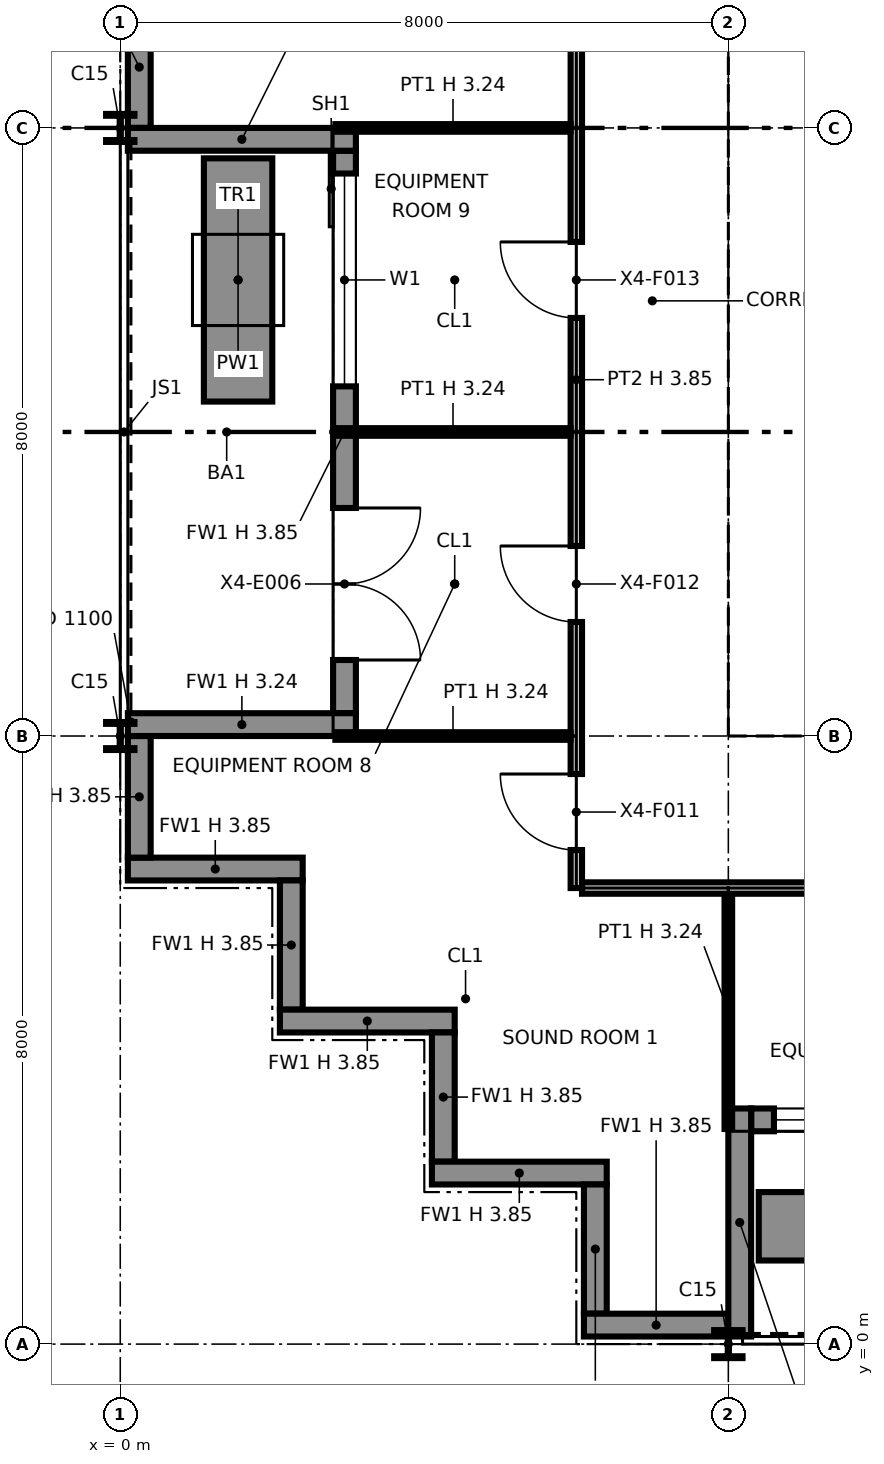
"""IFC4 building model, lengths in metres.
Left out: names, types, materials, properties, quantities, classifications, styles, units other than length and angle.
Written with IfcOpenShell. Run it as: python <this file> out.ifc"""

import sys

from ifc_helpers import new_model, si_unit, direction, frame, frame_2d, origin, origin_2d, place, context, subcontext, project, spatial, polyline, rectangle, i_section, outline, extrude, element, fill, save


model = new_model("IFC4")
c1 = context("Model", 3, precision=1e-05, world=origin(), true_north=direction((0.0, 1.0)))
c2 = subcontext(c1, "Body", "Model", "MODEL_VIEW")
j1 = project(units=[si_unit("LENGTHUNIT", "METRE"), si_unit("PLANEANGLEUNIT", "RADIAN")], contexts=[c1])
p1 = place(None, origin())
s1 = spatial("IfcSite", under=j1, at=p1, CompositionType="ELEMENT")
p2 = place(p1, origin())
s2 = spatial("IfcBuilding", under=s1, at=p2, CompositionType="ELEMENT")
p3 = place(p2, frame((0.0, 0.0, 279.0)))
s3 = spatial("IfcBuildingStorey", under=s2, at=p3, CompositionType="ELEMENT", Elevation=279.0)
for number, where, z_axis, x_axis in (
    (1, (0.0, 8.0, 0.0), (0.0, 0.0, 1.0), (1.0, 0.0, 0.0)),
    (2, (0.0, 16.0, 0.0), (0.0, 0.0, 1.0), (1.0, 0.0, 0.0)),
    (3, (8.0, 0.0, 0.0), (0.0, 0.0, 1.0), (1.0, 0.0, 0.0)),
):
    element("IfcColumn", number, at=place(p3, frame(where, z_axis=z_axis, x_axis=x_axis)), inside=s3, PredefinedType="COLUMN", context=c2, shape_type="SweptSolid", body=[
        extrude(i_section(OverallWidth=0.373, OverallDepth=0.368, WebThickness=0.015, FlangeThickness=0.024, at=origin_2d()), origin(), (0.0, 0.0, 1.0), 3.85),
    ])
for number, where, z_axis, x_axis in (
    (4, (8.0, 8.0, 0.0), (0.0, 0.0, 1.0), (1.0, 0.0, 0.0)),
    (5, (8.0, 16.0, 0.0), (0.0, 0.0, 1.0), (1.0, 0.0, 0.0)),
):
    element("IfcColumn", number, at=place(p3, frame(where, z_axis=z_axis, x_axis=x_axis)), inside=s3, PredefinedType="COLUMN", context=c2, shape_type="SweptSolid", body=[
        extrude(i_section(OverallWidth=0.257, OverallDepth=0.363, WebThickness=0.013, FlangeThickness=0.022, at=origin_2d()), origin(), (0.0, 0.0, 1.0), 3.85),
    ])
p4 = place(p3, frame((0.1, 6.25, 0.0), z_axis=(0.0, 0.0, 1.0), x_axis=(1.0, 0.0, 0.0)))
e6 = element("IfcWall", 6, at=p4, inside=s3, PredefinedType="SOLIDWALL", context=c2, shape_type="SweptSolid", body=[
    extrude(rectangle(XDim=2.3, YDim=0.3, at=frame_2d((1.15, 0.0))), origin(), (0.0, 0.0, 1.0), 3.85),
])
p5 = place(p3, frame((2.25, 6.1, 0.0), z_axis=(0.0, 0.0, 1.0), x_axis=(0.0, -1.0, 0.0)))
e7 = element("IfcWall", 7, at=p5, inside=s3, PredefinedType="SOLIDWALL", context=c2, shape_type="SweptSolid", body=[
    extrude(rectangle(XDim=1.7, YDim=0.3, at=frame_2d((0.85, 0.0))), origin(), (0.0, 0.0, 1.0), 3.85),
])
p6 = place(p3, frame((2.1, 4.25, 0.0), z_axis=(0.0, 0.0, 1.0), x_axis=(1.0, 0.0, 0.0)))
e8 = element("IfcWall", 8, at=p6, inside=s3, PredefinedType="SOLIDWALL", context=c2, shape_type="SweptSolid", body=[
    extrude(rectangle(XDim=2.3, YDim=0.3, at=frame_2d((1.15, 0.0))), origin(), (0.0, 0.0, 1.0), 3.85),
])
p7 = place(p3, frame((4.25, 4.1, 0.0), z_axis=(0.0, 0.0, 1.0), x_axis=(0.0, -1.0, 0.0)))
e9 = element("IfcWall", 9, at=p7, inside=s3, PredefinedType="SOLIDWALL", context=c2, shape_type="SweptSolid", body=[
    extrude(rectangle(XDim=1.7, YDim=0.3, at=frame_2d((0.85, 0.0))), origin(), (0.0, 0.0, 1.0), 3.85),
])
p8 = place(p3, frame((4.1, 2.25, 0.0), z_axis=(0.0, 0.0, 1.0), x_axis=(1.0, 0.0, 0.0)))
e10 = element("IfcWall", 10, at=p8, inside=s3, PredefinedType="SOLIDWALL", context=c2, shape_type="SweptSolid", body=[
    extrude(rectangle(XDim=2.3, YDim=0.3, at=frame_2d((1.15, 0.0))), origin(), (0.0, 0.0, 1.0), 3.85),
])
p9 = place(p3, frame((6.25, 2.1, 0.0), z_axis=(0.0, 0.0, 1.0), x_axis=(0.0, -1.0, 0.0)))
e11 = element("IfcWall", 11, at=p9, inside=s3, PredefinedType="SOLIDWALL", context=c2, shape_type="SweptSolid", body=[
    extrude(rectangle(XDim=1.7, YDim=0.3, at=frame_2d((0.85, 0.0))), origin(), (0.0, 0.0, 1.0), 3.85),
])
p10 = place(p3, frame((6.1, 0.25, 0.0), z_axis=(0.0, 0.0, 1.0), x_axis=(1.0, 0.0, 0.0)))
e12 = element("IfcWall", 12, at=p10, inside=s3, PredefinedType="SOLIDWALL", context=c2, shape_type="SweptSolid", body=[
    extrude(rectangle(XDim=1.9, YDim=0.3, at=frame_2d((0.95, 0.0))), origin(), (0.0, 0.0, 1.0), 3.85),
])
p11 = place(p3, frame((8.3, 2.95, 0.0), z_axis=(0.0, 0.0, 1.0), x_axis=(1.0, 0.0, 0.0)))
e13 = element("IfcWall", 13, at=p11, inside=s3, PredefinedType="SOLIDWALL", context=c2, shape_type="SweptSolid", body=[
    extrude(rectangle(XDim=7.4, YDim=0.3, at=frame_2d((3.7, 0.0))), origin(), (0.0, 0.0, 1.0), 3.85),
])
p12 = place(p11, frame((0.3, 0.0, 0.9)))
e14 = element("IfcOpeningElement", 14, at=p12, cuts=e13, PredefinedType="OPENING", context=c2, shape_type="SweptSolid", body=[
    extrude(rectangle(XDim=2.8, YDim=2.2, at=frame_2d((1.4, 1.1))), frame((0.0, 0.16, 0.0), z_axis=(0.0, -1.0, 0.0), x_axis=(1.0, 0.0, 0.0)), (0.0, 0.0, 1.0), 0.32),
])
p13 = place(p11, frame((4.7, 0.0, 0.0)))
e15 = element("IfcOpeningElement", 15, at=p13, cuts=e13, PredefinedType="OPENING", context=c2, shape_type="SweptSolid", body=[
    extrude(rectangle(XDim=2.0, YDim=2.4, at=frame_2d((1.0, 1.2))), frame((0.0, 0.16, 0.0), z_axis=(0.0, -1.0, 0.0), x_axis=(1.0, 0.0, 0.0)), (0.0, 0.0, 1.0), 0.32),
])
p14 = place(p3, frame((8.15, 0.1, 0.0), z_axis=(0.0, 0.0, 1.0), x_axis=(0.0, 1.0, 0.0)))
e16 = element("IfcWall", 16, at=p14, inside=s3, PredefinedType="SOLIDWALL", context=c2, shape_type="SweptSolid", body=[
    extrude(rectangle(XDim=3.0, YDim=0.3, at=frame_2d((1.5, 0.0))), origin(), (0.0, 0.0, 1.0), 3.237),
])
p15 = place(p3, frame((8.4, 1.55, 0.0), z_axis=(0.0, 0.0, 1.0), x_axis=(1.0, 0.0, 0.0)))
e17 = element("IfcWall", 17, at=p15, inside=s3, PredefinedType="SOLIDWALL", context=c2, shape_type="SweptSolid", body=[
    extrude(rectangle(XDim=3.2, YDim=0.9, at=frame_2d((1.6, 0.0))), origin(), (0.0, 0.0, 1.0), 0.6),
])
p16 = place(p3, frame((0.25, 17.6, 0.0), z_axis=(0.0, 0.0, 1.0), x_axis=(0.0, -1.0, 0.0)))
e18 = element("IfcWall", 18, at=p16, inside=s3, PredefinedType="SOLIDWALL", context=c2, shape_type="SweptSolid", body=[
    extrude(rectangle(XDim=1.6, YDim=0.3, at=frame_2d((0.8, 0.0))), origin(), (0.0, 0.0, 1.0), 3.85),
])
p17 = place(p3, frame((2.95, 15.7, 0.0), z_axis=(0.0, 0.0, 1.0), x_axis=(0.0, -1.0, 0.0)))
e19 = element("IfcWall", 19, at=p17, inside=s3, PredefinedType="SOLIDWALL", context=c2, shape_type="SweptSolid", body=[
    extrude(rectangle(XDim=7.4, YDim=0.3, at=frame_2d((3.7, 0.0))), origin(), (0.0, 0.0, 1.0), 3.85),
])
p18 = place(p17, frame((0.3, 0.0, 0.9)))
e20 = element("IfcOpeningElement", 20, at=p18, cuts=e19, PredefinedType="OPENING", context=c2, shape_type="SweptSolid", body=[
    extrude(rectangle(XDim=2.8, YDim=2.2, at=frame_2d((1.4, 1.1))), frame((0.0, 0.16, 0.0), z_axis=(0.0, -1.0, 0.0), x_axis=(1.0, 0.0, 0.0)), (0.0, 0.0, 1.0), 0.32),
])
p19 = place(p17, frame((4.7, 0.0, 0.0)))
e21 = element("IfcOpeningElement", 21, at=p19, cuts=e19, PredefinedType="OPENING", context=c2, shape_type="SweptSolid", body=[
    extrude(rectangle(XDim=2.0, YDim=2.4, at=frame_2d((1.0, 1.2))), frame((0.0, 0.16, 0.0), z_axis=(0.0, -1.0, 0.0), x_axis=(1.0, 0.0, 0.0)), (0.0, 0.0, 1.0), 0.32),
])
for number, where, z_axis, x_axis in (
    (22, (0.1, 15.85, 0.0), (0.0, 0.0, 1.0), (1.0, 0.0, 0.0)),
    (23, (0.1, 8.15, 0.0), (0.0, 0.0, 1.0), (1.0, 0.0, 0.0)),
):
    element("IfcWall", number, at=place(p3, frame(where, z_axis=z_axis, x_axis=x_axis)), inside=s3, PredefinedType="SOLIDWALL", context=c2, shape_type="SweptSolid", body=[
        extrude(rectangle(XDim=3.0, YDim=0.3, at=frame_2d((1.5, 0.0))), origin(), (0.0, 0.0, 1.0), 3.237),
    ])
p20 = place(p3, frame((0.25, 8.0, 0.0), z_axis=(0.0, 0.0, 1.0), x_axis=(0.0, -1.0, 0.0)))
e24 = element("IfcWall", 24, at=p20, inside=s3, PredefinedType="SOLIDWALL", context=c2, shape_type="SweptSolid", body=[
    extrude(rectangle(XDim=1.6, YDim=0.3, at=frame_2d((0.8, 0.0))), origin(), (0.0, 0.0, 1.0), 3.85),
])
p21 = place(p3, frame((1.55, 15.6, 0.0), z_axis=(0.0, 0.0, 1.0), x_axis=(0.0, -1.0, 0.0)))
e25 = element("IfcWall", 25, at=p21, inside=s3, PredefinedType="SOLIDWALL", context=c2, shape_type="SweptSolid", body=[
    extrude(rectangle(XDim=3.2, YDim=0.9, at=frame_2d((1.6, 0.0))), origin(), (0.0, 0.0, 1.0), 0.6),
])
p22 = place(p3, frame((8.65, 8.75, 0.0), z_axis=(0.0, 0.0, 1.0), x_axis=(1.0, 0.0, 0.0)))
e26 = element("IfcWall", 26, at=p22, inside=s3, PredefinedType="PARTITIONING", context=c2, shape_type="SweptSolid", body=[
    extrude(outline(polyline([(0.0, 0.0), (14.7, 0.0), (14.7, 3.85), (7.438, 3.85), (7.437, 3.318), (7.263, 3.318), (7.262, 3.85), (0.0, 3.85), (0.0, 0.0)])), frame((0.0, 0.1, 0.0), z_axis=(0.0, -1.0, 0.0), x_axis=(1.0, 0.0, 0.0)), (0.0, 0.0, 1.0), 0.2),
])
p23 = place(p22, frame((1.3, 0.0, 0.0)))
e27 = element("IfcOpeningElement", 27, at=p23, cuts=e26, PredefinedType="OPENING", context=c2, shape_type="SweptSolid", body=[
    extrude(rectangle(XDim=1.4, YDim=2.1, at=frame_2d((0.7, 1.05))), frame((0.0, 0.11, 0.0), z_axis=(0.0, -1.0, 0.0), x_axis=(1.0, 0.0, 0.0)), (0.0, 0.0, 1.0), 0.22),
])
p24 = place(p22, frame((4.6, 0.0, 0.0)))
e28 = element("IfcOpeningElement", 28, at=p24, cuts=e26, PredefinedType="OPENING", context=c2, shape_type="SweptSolid", body=[
    extrude(rectangle(XDim=1.4, YDim=2.1, at=frame_2d((0.7, 1.05))), frame((0.0, 0.11, 0.0), z_axis=(0.0, -1.0, 0.0), x_axis=(1.0, 0.0, 0.0)), (0.0, 0.0, 1.0), 0.22),
])
p25 = place(p22, frame((10.4, 0.0, 0.0)))
e29 = element("IfcOpeningElement", 29, at=p25, cuts=e26, PredefinedType="OPENING", context=c2, shape_type="SweptSolid", body=[
    extrude(rectangle(XDim=1.2, YDim=2.1, at=frame_2d((0.6, 1.05))), frame((0.0, 0.11, 0.0), z_axis=(0.0, -1.0, 0.0), x_axis=(1.0, 0.0, 0.0)), (0.0, 0.0, 1.0), 0.22),
])
p26 = place(p3, frame((8.75, 8.85, 0.0), z_axis=(0.0, 0.0, 1.0), x_axis=(0.0, 1.0, 0.0)))
e30 = element("IfcWall", 30, at=p26, inside=s3, PredefinedType="PARTITIONING", context=c2, shape_type="SweptSolid", body=[
    extrude(outline(polyline([(0.0, 0.0), (14.3, 0.0), (14.3, 3.85), (10.225, 3.85), (10.224, 3.44), (10.076, 3.44), (10.075, 3.85), (7.238, 3.85), (7.237, 3.318), (7.063, 3.318), (7.062, 3.85), (0.0, 3.85), (0.0, 0.0)])), frame((0.0, 0.1, 0.0), z_axis=(0.0, -1.0, 0.0), x_axis=(1.0, 0.0, 0.0)), (0.0, 0.0, 1.0), 0.2),
])
p27 = place(p26, frame((8.3, 0.0, 0.0)))
e31 = element("IfcOpeningElement", 31, at=p27, cuts=e30, PredefinedType="OPENING", context=c2, shape_type="SweptSolid", body=[
    extrude(rectangle(XDim=1.8, YDim=2.1, at=frame_2d((0.9, 1.05))), frame((0.0, 0.11, 0.0), z_axis=(0.0, -1.0, 0.0), x_axis=(1.0, 0.0, 0.0)), (0.0, 0.0, 1.0), 0.22),
])
p28 = place(p3, frame((8.85, 16.0, 0.0), z_axis=(0.0, 0.0, 1.0), x_axis=(1.0, 0.0, 0.0)))
e32 = element("IfcWall", 32, at=p28, inside=s3, PredefinedType="PARTITIONING", context=c2, shape_type="SweptSolid", body=[
    extrude(rectangle(XDim=6.958, YDim=0.6, at=frame_2d((3.479, 0.0))), origin(), (0.0, 0.0, 1.0), 3.318),
])
p29 = place(p3, frame((8.0, 2.83, 0.0), z_axis=(0.0, 0.0, 1.0), x_axis=(0.0, 1.0, 0.0)))
e33 = element("IfcWall", 33, at=p29, inside=s3, PredefinedType="PARTITIONING", context=c2, shape_type="SweptSolid", body=[
    extrude(rectangle(XDim=3.095, YDim=0.1, at=frame_2d((1.547, 0.0))), origin(), (0.0, 0.0, 1.0), 3.238),
])
p30 = place(p3, frame((6.075, 6.0, 0.0), z_axis=(0.0, 0.0, 1.0), x_axis=(1.0, 0.0, 0.0)))
e34 = element("IfcWall", 34, at=p30, inside=s3, PredefinedType="PARTITIONING", context=c2, shape_type="SweptSolid", body=[
    extrude(rectangle(XDim=35.85, YDim=0.15, at=frame_2d((17.925, 0.0))), origin(), (0.0, 0.0, 1.0), 3.85),
])
p31 = place(p30, frame((12.425, 0.0, 0.0), z_axis=(0.0, 0.0, 1.0), x_axis=(-1.0, 0.0, 0.0)))
e35 = element("IfcOpeningElement", 35, at=p31, cuts=e34, PredefinedType="OPENING", context=c2, shape_type="SweptSolid", body=[
    extrude(rectangle(XDim=1.0, YDim=2.1, at=frame_2d((0.5, 1.05))), frame((0.0, 0.085, 0.0), z_axis=(0.0, -1.0, 0.0), x_axis=(1.0, 0.0, 0.0)), (0.0, 0.0, 1.0), 0.17),
])
p32 = place(p30, frame((16.425, 0.0, 0.0), z_axis=(0.0, 0.0, 1.0), x_axis=(-1.0, 0.0, 0.0)))
e36 = element("IfcOpeningElement", 36, at=p32, cuts=e34, PredefinedType="OPENING", context=c2, shape_type="SweptSolid", body=[
    extrude(rectangle(XDim=1.0, YDim=2.1, at=frame_2d((0.5, 1.05))), frame((0.0, 0.085, 0.0), z_axis=(0.0, -1.0, 0.0), x_axis=(1.0, 0.0, 0.0)), (0.0, 0.0, 1.0), 0.17),
])
p33 = place(p30, frame((30.425, 0.0, 0.0), z_axis=(0.0, 0.0, 1.0), x_axis=(-1.0, 0.0, 0.0)))
e37 = element("IfcOpeningElement", 37, at=p33, cuts=e34, PredefinedType="OPENING", context=c2, shape_type="SweptSolid", body=[
    extrude(rectangle(XDim=1.0, YDim=2.1, at=frame_2d((0.5, 1.05))), frame((0.0, 0.085, 0.0), z_axis=(0.0, -1.0, 0.0), x_axis=(1.0, 0.0, 0.0)), (0.0, 0.0, 1.0), 0.17),
])
p34 = place(p30, frame((4.425, 0.0, 0.0), z_axis=(0.0, 0.0, 1.0), x_axis=(-1.0, 0.0, 0.0)))
e38 = element("IfcOpeningElement", 38, at=p34, cuts=e34, PredefinedType="OPENING", context=c2, shape_type="SweptSolid", body=[
    extrude(rectangle(XDim=1.0, YDim=2.1, at=frame_2d((0.5, 1.05))), frame((0.0, 0.085, 0.0), z_axis=(0.0, -1.0, 0.0), x_axis=(1.0, 0.0, 0.0)), (0.0, 0.0, 1.0), 0.17),
])
p35 = place(p30, frame((8.425, 0.0, 0.0), z_axis=(0.0, 0.0, 1.0), x_axis=(-1.0, 0.0, 0.0)))
e39 = element("IfcOpeningElement", 39, at=p35, cuts=e34, PredefinedType="OPENING", context=c2, shape_type="SweptSolid", body=[
    extrude(rectangle(XDim=1.0, YDim=2.1, at=frame_2d((0.5, 1.05))), frame((0.0, 0.085, 0.0), z_axis=(0.0, -1.0, 0.0), x_axis=(1.0, 0.0, 0.0)), (0.0, 0.0, 1.0), 0.17),
])
p36 = place(p30, frame((19.425, 0.0, 0.0), z_axis=(0.0, 0.0, 1.0), x_axis=(-1.0, 0.0, 0.0)))
e40 = element("IfcOpeningElement", 40, at=p36, cuts=e34, PredefinedType="OPENING", context=c2, shape_type="SweptSolid", body=[
    extrude(rectangle(XDim=1.0, YDim=2.1, at=frame_2d((0.5, 1.05))), frame((0.0, 0.085, 0.0), z_axis=(0.0, -1.0, 0.0), x_axis=(1.0, 0.0, 0.0)), (0.0, 0.0, 1.0), 0.17),
])
p37 = place(p30, frame((24.425, 0.0, 0.0), z_axis=(0.0, 0.0, 1.0), x_axis=(-1.0, 0.0, 0.0)))
e41 = element("IfcOpeningElement", 41, at=p37, cuts=e34, PredefinedType="OPENING", context=c2, shape_type="SweptSolid", body=[
    extrude(rectangle(XDim=1.0, YDim=2.1, at=frame_2d((0.5, 1.05))), frame((0.0, 0.085, 0.0), z_axis=(0.0, -1.0, 0.0), x_axis=(1.0, 0.0, 0.0)), (0.0, 0.0, 1.0), 0.17),
])
p38 = place(p3, frame((6.0, 6.0, 0.0), z_axis=(0.0, 0.0, 1.0), x_axis=(0.0, 1.0, 0.0)))
e42 = element("IfcWall", 42, at=p38, inside=s3, PredefinedType="PARTITIONING", context=c2, shape_type="SweptSolid", body=[
    extrude(outline(polyline([(0.0, 0.0), (13.375, 0.0), (13.375, 3.85), (10.3, 3.85), (10.298, 3.238), (9.702, 3.238), (9.7, 3.85), (6.3, 3.85), (6.298, 3.238), (5.702, 3.238), (5.7, 3.85), (2.3, 3.85), (2.298, 3.238), (1.702, 3.238), (1.7, 3.85), (0.0, 3.85), (0.0, 0.0)])), frame((0.0, 0.075, 0.0), z_axis=(0.0, -1.0, 0.0), x_axis=(1.0, 0.0, 0.0)), (0.0, 0.0, 1.0), 0.15),
])
p39 = place(p38, frame((0.5, 0.0, 0.0)))
e43 = element("IfcOpeningElement", 43, at=p39, cuts=e42, PredefinedType="OPENING", context=c2, shape_type="SweptSolid", body=[
    extrude(rectangle(XDim=1.0, YDim=2.1, at=frame_2d((0.5, 1.05))), frame((0.0, 0.085, 0.0), z_axis=(0.0, -1.0, 0.0), x_axis=(1.0, 0.0, 0.0)), (0.0, 0.0, 1.0), 0.17),
])
p40 = place(p38, frame((3.5, 0.0, 0.0)))
e44 = element("IfcOpeningElement", 44, at=p40, cuts=e42, PredefinedType="OPENING", context=c2, shape_type="SweptSolid", body=[
    extrude(rectangle(XDim=1.0, YDim=2.1, at=frame_2d((0.5, 1.05))), frame((0.0, 0.085, 0.0), z_axis=(0.0, -1.0, 0.0), x_axis=(1.0, 0.0, 0.0)), (0.0, 0.0, 1.0), 0.17),
])
p41 = place(p38, frame((7.5, 0.0, 0.0)))
e45 = element("IfcOpeningElement", 45, at=p41, cuts=e42, PredefinedType="OPENING", context=c2, shape_type="SweptSolid", body=[
    extrude(rectangle(XDim=1.0, YDim=2.1, at=frame_2d((0.5, 1.05))), frame((0.0, 0.085, 0.0), z_axis=(0.0, -1.0, 0.0), x_axis=(1.0, 0.0, 0.0)), (0.0, 0.0, 1.0), 0.17),
])
p42 = place(p38, frame((11.225, 0.0, 0.0)))
e46 = element("IfcOpeningElement", 46, at=p42, cuts=e42, PredefinedType="OPENING", context=c2, shape_type="SweptSolid", body=[
    extrude(rectangle(XDim=1.0, YDim=2.1, at=frame_2d((0.5, 1.05))), frame((0.0, 0.085, 0.0), z_axis=(0.0, -1.0, 0.0), x_axis=(1.0, 0.0, 0.0)), (0.0, 0.0, 1.0), 0.17),
])
for number, where, z_axis, x_axis in (
    (47, (2.83, 8.0, 0.0), (0.0, 0.0, 1.0), (1.0, 0.0, 0.0)),
    (48, (2.83, 12.0, 0.0), (0.0, 0.0, 1.0), (1.0, 0.0, 0.0)),
    (49, (2.83, 16.0, 0.0), (0.0, 0.0, 1.0), (1.0, 0.0, 0.0)),
):
    element("IfcWall", number, at=place(p3, frame(where, z_axis=z_axis, x_axis=x_axis)), inside=s3, PredefinedType="PARTITIONING", context=c2, shape_type="SweptSolid", body=[
        extrude(rectangle(XDim=3.095, YDim=0.1, at=frame_2d((1.547, 0.0))), origin(), (0.0, 0.0, 1.0), 3.238),
    ])
p43 = place(p12, origin())
e50 = element("IfcWindow", 50, at=p43, inside=s3, PartitioningType="SINGLE_PANEL", PredefinedType="WINDOW", context=c2, shape_type="SweptSolid", body=[
    extrude(rectangle(XDim=2.8, YDim=2.2, at=frame_2d((1.4, 1.1))), frame((0.0, 0.03, 0.0), z_axis=(0.0, -1.0, 0.0), x_axis=(1.0, 0.0, 0.0)), (0.0, 0.0, 1.0), 0.06),
])
fill(e14, e50)
p44 = place(p18, origin())
e51 = element("IfcWindow", 51, at=p44, inside=s3, PartitioningType="SINGLE_PANEL", PredefinedType="WINDOW", context=c2, shape_type="SweptSolid", body=[
    extrude(rectangle(XDim=2.8, YDim=2.2, at=frame_2d((1.4, 1.1))), frame((0.0, 0.03, 0.0), z_axis=(0.0, -1.0, 0.0), x_axis=(1.0, 0.0, 0.0)), (0.0, 0.0, 1.0), 0.06),
])
fill(e20, e51)
p45 = place(p19, origin())
e52 = element("IfcDoor", 52, at=p45, inside=s3, OperationType="DOUBLE_DOOR_SINGLE_SWING", PredefinedType="DOOR", context=c2, shape_type="SweptSolid", body=[
    extrude(rectangle(XDim=2.0, YDim=2.4, at=frame_2d((1.0, 1.2))), frame((0.0, 0.025, 0.0), z_axis=(0.0, -1.0, 0.0), x_axis=(1.0, 0.0, 0.0)), (0.0, 0.0, 1.0), 0.05),
])
fill(e21, e52)
p46 = place(p39, origin())
e53 = element("IfcDoor", 53, at=p46, inside=s3, OperationType="SINGLE_SWING_RIGHT", PredefinedType="DOOR", context=c2, shape_type="SweptSolid", body=[
    extrude(rectangle(XDim=1.0, YDim=2.1, at=frame_2d((0.5, 1.05))), frame((0.0, 0.025, 0.0), z_axis=(0.0, -1.0, 0.0), x_axis=(1.0, 0.0, 0.0)), (0.0, 0.0, 1.0), 0.05),
])
fill(e43, e53)
p47 = place(p40, origin())
e54 = element("IfcDoor", 54, at=p47, inside=s3, OperationType="SINGLE_SWING_RIGHT", PredefinedType="DOOR", context=c2, shape_type="SweptSolid", body=[
    extrude(rectangle(XDim=1.0, YDim=2.1, at=frame_2d((0.5, 1.05))), frame((0.0, 0.025, 0.0), z_axis=(0.0, -1.0, 0.0), x_axis=(1.0, 0.0, 0.0)), (0.0, 0.0, 1.0), 0.05),
])
fill(e44, e54)
p48 = place(p41, origin())
e55 = element("IfcDoor", 55, at=p48, inside=s3, OperationType="SINGLE_SWING_RIGHT", PredefinedType="DOOR", context=c2, shape_type="SweptSolid", body=[
    extrude(rectangle(XDim=1.0, YDim=2.1, at=frame_2d((0.5, 1.05))), frame((0.0, 0.025, 0.0), z_axis=(0.0, -1.0, 0.0), x_axis=(1.0, 0.0, 0.0)), (0.0, 0.0, 1.0), 0.05),
])
fill(e45, e55)
save(model, sys.argv[1])
